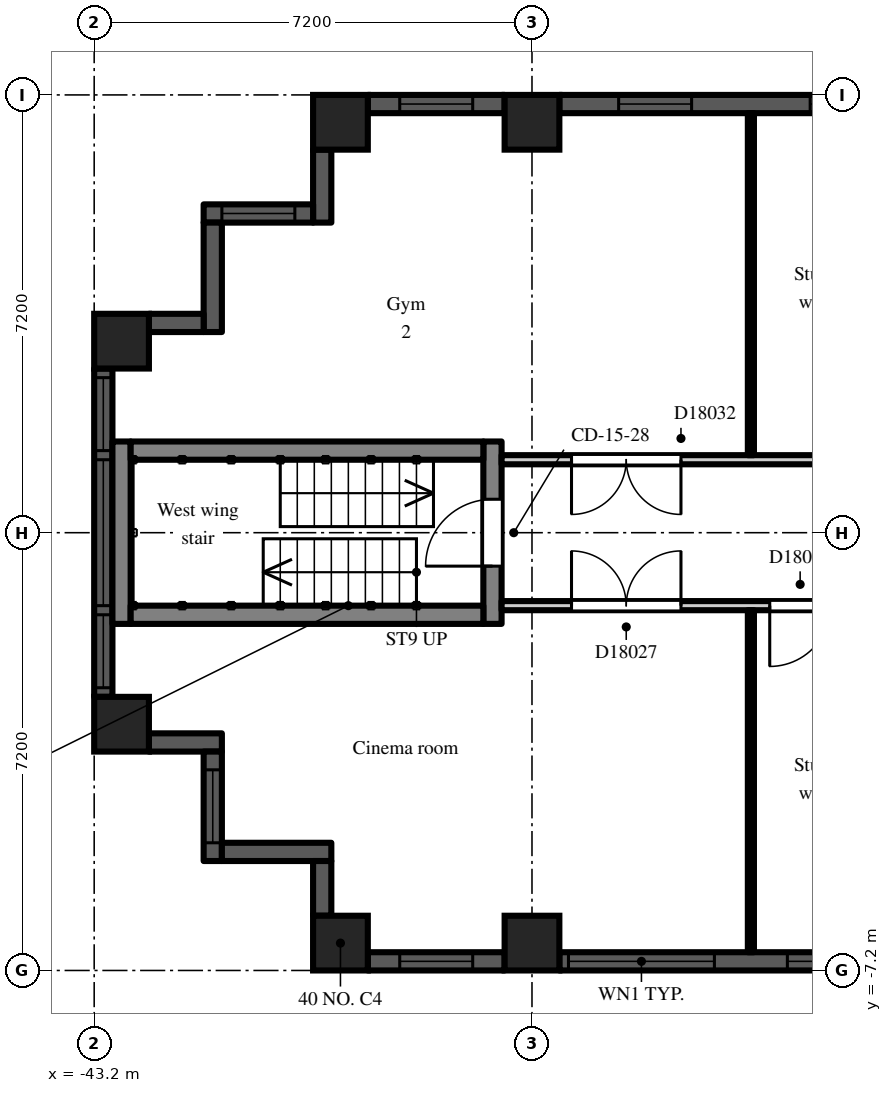
"""IFC4 building model, lengths in metres.
Left out: names, types, materials, properties, quantities, classifications, styles, units other than length and angle.
Written with IfcOpenShell. Run it as: python <this file> out.ifc"""

import sys

from ifc_helpers import new_model, si_unit, direction, frame, frame_2d, origin, origin_2d, place, context, subcontext, project, spatial, rectangle, extrude, element, fill, save


model = new_model("IFC4")
c1 = context("Model", 3, precision=1e-05, world=origin(), true_north=direction((0.0, 1.0)))
c2 = subcontext(c1, "Body", "Model", "MODEL_VIEW")
j1 = project(units=[si_unit("LENGTHUNIT", "METRE"), si_unit("PLANEANGLEUNIT", "RADIAN")], contexts=[c1])
p1 = place(None, origin())
s1 = spatial("IfcSite", under=j1, at=p1, CompositionType="ELEMENT")
p2 = place(p1, origin())
s2 = spatial("IfcBuilding", under=s1, at=p2, CompositionType="ELEMENT")
p3 = place(p2, frame((0.0, 0.0, 120.3)))
s3 = spatial("IfcBuildingStorey", under=s2, at=p3, CompositionType="ELEMENT", Elevation=120.3)
for number, where, z_axis, x_axis in (
    (1, (-42.75, -3.15, 0.0), (0.0, 0.0, 1.0), (1.0, 0.0, 0.0)),
    (2, (-42.75, 3.15, 0.0), (0.0, 0.0, 1.0), (1.0, 0.0, 0.0)),
    (3, (-39.15, -6.75, 0.0), (0.0, 0.0, 1.0), (1.0, 0.0, 0.0)),
    (4, (-39.15, 6.75, 0.0), (0.0, 0.0, 1.0), (1.0, 0.0, 0.0)),
    (5, (-36.0, -6.75, 0.0), (0.0, 0.0, 1.0), (1.0, 0.0, 0.0)),
    (6, (-36.0, 6.75, 0.0), (0.0, 0.0, 1.0), (1.0, 0.0, 0.0)),
):
    element("IfcColumn", number, at=place(p3, frame(where, z_axis=z_axis, x_axis=x_axis)), inside=s3, PredefinedType="COLUMN", context=c2, shape_type="SweptSolid", body=[
        extrude(rectangle(XDim=0.9, YDim=0.9, at=origin_2d()), origin(), (0.0, 0.0, 1.0), 3.0),
    ])
p4 = place(p3, frame((-29.25, 7.05, 0.0), z_axis=(0.0, 0.0, 1.0), x_axis=(-1.0, 0.0, 0.0)))
e7 = element("IfcWall", 7, at=p4, inside=s3, PredefinedType="SOLIDWALL", context=c2, shape_type="SweptSolid", body=[
    extrude(rectangle(XDim=6.3, YDim=0.3, at=frame_2d((3.15, 0.0))), origin(), (0.0, 0.0, 1.0), 2.2),
])
p5 = place(p4, frame((0.975, 0.0, 0.2)))
e8 = element("IfcOpeningElement", 8, at=p5, cuts=e7, PredefinedType="OPENING", context=c2, shape_type="SweptSolid", body=[
    extrude(rectangle(XDim=1.2, YDim=1.85, at=frame_2d((0.6, 0.925))), frame((0.0, 0.16, 0.0), z_axis=(0.0, -1.0, 0.0), x_axis=(1.0, 0.0, 0.0)), (0.0, 0.0, 1.0), 0.32),
])
p6 = place(p4, frame((4.125, 0.0, 0.2)))
e9 = element("IfcOpeningElement", 9, at=p6, cuts=e7, PredefinedType="OPENING", context=c2, shape_type="SweptSolid", body=[
    extrude(rectangle(XDim=1.2, YDim=1.85, at=frame_2d((0.6, 0.925))), frame((0.0, 0.16, 0.0), z_axis=(0.0, -1.0, 0.0), x_axis=(1.0, 0.0, 0.0)), (0.0, 0.0, 1.0), 0.32),
])
p7 = place(p3, frame((-36.45, 7.05, 0.0), z_axis=(0.0, 0.0, 1.0), x_axis=(-1.0, 0.0, 0.0)))
e10 = element("IfcWall", 10, at=p7, inside=s3, PredefinedType="SOLIDWALL", context=c2, shape_type="SweptSolid", body=[
    extrude(rectangle(XDim=2.25, YDim=0.3, at=frame_2d((1.125, 0.0))), origin(), (0.0, 0.0, 1.0), 2.2),
])
p8 = place(p7, frame((0.525, 0.0, 0.2)))
e11 = element("IfcOpeningElement", 11, at=p8, cuts=e10, PredefinedType="OPENING", context=c2, shape_type="SweptSolid", body=[
    extrude(rectangle(XDim=1.2, YDim=1.85, at=frame_2d((0.6, 0.925))), frame((0.0, 0.16, 0.0), z_axis=(0.0, -1.0, 0.0), x_axis=(1.0, 0.0, 0.0)), (0.0, 0.0, 1.0), 0.32),
])
p9 = place(p3, frame((-39.45, 6.3, 0.0), z_axis=(0.0, 0.0, 1.0), x_axis=(0.0, -1.0, 0.0)))
e12 = element("IfcWall", 12, at=p9, inside=s3, PredefinedType="SOLIDWALL", context=c2, shape_type="SweptSolid", body=[
    extrude(rectangle(XDim=1.2, YDim=0.3, at=frame_2d((0.6, 0.0))), origin(), (0.0, 0.0, 1.0), 2.6),
])
p10 = place(p3, frame((-39.6, 5.25, 0.0), z_axis=(0.0, 0.0, 1.0), x_axis=(-1.0, 0.0, 0.0)))
e13 = element("IfcWall", 13, at=p10, inside=s3, PredefinedType="SOLIDWALL", context=c2, shape_type="SweptSolid", body=[
    extrude(rectangle(XDim=1.8, YDim=0.3, at=frame_2d((0.9, 0.0))), origin(), (0.0, 0.0, 1.0), 2.6),
])
p11 = place(p10, frame((0.3, 0.0, 0.2)))
e14 = element("IfcOpeningElement", 14, at=p11, cuts=e13, PredefinedType="OPENING", context=c2, shape_type="SweptSolid", body=[
    extrude(rectangle(XDim=1.2, YDim=1.85, at=frame_2d((0.6, 0.925))), frame((0.0, 0.16, 0.0), z_axis=(0.0, -1.0, 0.0), x_axis=(1.0, 0.0, 0.0)), (0.0, 0.0, 1.0), 0.32),
])
p12 = place(p3, frame((-41.25, 5.1, 0.0), z_axis=(0.0, 0.0, 1.0), x_axis=(0.0, -1.0, 0.0)))
e15 = element("IfcWall", 15, at=p12, inside=s3, PredefinedType="SOLIDWALL", context=c2, shape_type="SweptSolid", body=[
    extrude(rectangle(XDim=1.8, YDim=0.3, at=frame_2d((0.9, 0.0))), origin(), (0.0, 0.0, 1.0), 2.6),
])
p13 = place(p3, frame((-41.4, 3.45, 0.0), z_axis=(0.0, 0.0, 1.0), x_axis=(-1.0, 0.0, 0.0)))
e16 = element("IfcWall", 16, at=p13, inside=s3, PredefinedType="SOLIDWALL", context=c2, shape_type="SweptSolid", body=[
    extrude(rectangle(XDim=0.9, YDim=0.3, at=frame_2d((0.45, 0.0))), origin(), (0.0, 0.0, 1.0), 2.6),
])
p14 = place(p3, frame((-43.05, 2.7, 0.0), z_axis=(0.0, 0.0, 1.0), x_axis=(0.0, -1.0, 0.0)))
e17 = element("IfcWall", 17, at=p14, inside=s3, PredefinedType="SOLIDWALL", context=c2, shape_type="SweptSolid", body=[
    extrude(rectangle(XDim=5.4, YDim=0.3, at=frame_2d((2.7, 0.0))), origin(), (0.0, 0.0, 1.0), 2.2),
])
p15 = place(p14, frame((1.5, 0.0, 0.2)))
e18 = element("IfcOpeningElement", 18, at=p15, cuts=e17, PredefinedType="OPENING", context=c2, shape_type="SweptSolid", body=[
    extrude(rectangle(XDim=2.4, YDim=1.85, at=frame_2d((1.2, 0.925))), frame((0.0, 0.16, 0.0), z_axis=(0.0, -1.0, 0.0), x_axis=(1.0, 0.0, 0.0)), (0.0, 0.0, 1.0), 0.32),
])
p16 = place(p14, frame((0.15, 0.0, 0.2)))
e19 = element("IfcOpeningElement", 19, at=p16, cuts=e17, PredefinedType="OPENING", context=c2, shape_type="SweptSolid", body=[
    extrude(rectangle(XDim=1.2, YDim=1.85, at=frame_2d((0.6, 0.925))), frame((0.0, 0.16, 0.0), z_axis=(0.0, -1.0, 0.0), x_axis=(1.0, 0.0, 0.0)), (0.0, 0.0, 1.0), 0.32),
])
p17 = place(p14, frame((4.05, 0.0, 0.2)))
e20 = element("IfcOpeningElement", 20, at=p17, cuts=e17, PredefinedType="OPENING", context=c2, shape_type="SweptSolid", body=[
    extrude(rectangle(XDim=1.2, YDim=1.85, at=frame_2d((0.6, 0.925))), frame((0.0, 0.16, 0.0), z_axis=(0.0, -1.0, 0.0), x_axis=(1.0, 0.0, 0.0)), (0.0, 0.0, 1.0), 0.32),
])
p18 = place(p3, frame((-42.3, -3.45, 0.0), z_axis=(0.0, 0.0, 1.0), x_axis=(1.0, 0.0, 0.0)))
e21 = element("IfcWall", 21, at=p18, inside=s3, PredefinedType="SOLIDWALL", context=c2, shape_type="SweptSolid", body=[
    extrude(rectangle(XDim=1.2, YDim=0.3, at=frame_2d((0.6, 0.0))), origin(), (0.0, 0.0, 1.0), 2.6),
])
p19 = place(p3, frame((-41.25, -3.6, 0.0), z_axis=(0.0, 0.0, 1.0), x_axis=(0.0, -1.0, 0.0)))
e22 = element("IfcWall", 22, at=p19, inside=s3, PredefinedType="SOLIDWALL", context=c2, shape_type="SweptSolid", body=[
    extrude(rectangle(XDim=1.8, YDim=0.3, at=frame_2d((0.9, 0.0))), origin(), (0.0, 0.0, 1.0), 2.6),
])
p20 = place(p19, frame((0.3, 0.0, 0.2)))
e23 = element("IfcOpeningElement", 23, at=p20, cuts=e22, PredefinedType="OPENING", context=c2, shape_type="SweptSolid", body=[
    extrude(rectangle(XDim=1.2, YDim=1.85, at=frame_2d((0.6, 0.925))), frame((0.0, 0.16, 0.0), z_axis=(0.0, -1.0, 0.0), x_axis=(1.0, 0.0, 0.0)), (0.0, 0.0, 1.0), 0.32),
])
p21 = place(p3, frame((-41.1, -5.25, 0.0), z_axis=(0.0, 0.0, 1.0), x_axis=(1.0, 0.0, 0.0)))
e24 = element("IfcWall", 24, at=p21, inside=s3, PredefinedType="SOLIDWALL", context=c2, shape_type="SweptSolid", body=[
    extrude(rectangle(XDim=1.8, YDim=0.3, at=frame_2d((0.9, 0.0))), origin(), (0.0, 0.0, 1.0), 2.6),
])
p22 = place(p3, frame((-39.45, -5.4, 0.0), z_axis=(0.0, 0.0, 1.0), x_axis=(0.0, -1.0, 0.0)))
e25 = element("IfcWall", 25, at=p22, inside=s3, PredefinedType="SOLIDWALL", context=c2, shape_type="SweptSolid", body=[
    extrude(rectangle(XDim=0.9, YDim=0.3, at=frame_2d((0.45, 0.0))), origin(), (0.0, 0.0, 1.0), 2.6),
])
p23 = place(p3, frame((-38.7, -7.05, 0.0), z_axis=(0.0, 0.0, 1.0), x_axis=(1.0, 0.0, 0.0)))
e26 = element("IfcWall", 26, at=p23, inside=s3, PredefinedType="SOLIDWALL", context=c2, shape_type="SweptSolid", body=[
    extrude(rectangle(XDim=2.25, YDim=0.3, at=frame_2d((1.125, 0.0))), origin(), (0.0, 0.0, 1.0), 2.2),
])
p24 = place(p23, frame((0.525, 0.0, 0.2)))
e27 = element("IfcOpeningElement", 27, at=p24, cuts=e26, PredefinedType="OPENING", context=c2, shape_type="SweptSolid", body=[
    extrude(rectangle(XDim=1.2, YDim=1.85, at=frame_2d((0.6, 0.925))), frame((0.0, 0.16, 0.0), z_axis=(0.0, -1.0, 0.0), x_axis=(1.0, 0.0, 0.0)), (0.0, 0.0, 1.0), 0.32),
])
p25 = place(p3, frame((-35.55, -7.05, 0.0), z_axis=(0.0, 0.0, 1.0), x_axis=(1.0, 0.0, 0.0)))
e28 = element("IfcWall", 28, at=p25, inside=s3, PredefinedType="SOLIDWALL", context=c2, shape_type="SweptSolid", body=[
    extrude(rectangle(XDim=6.3, YDim=0.3, at=frame_2d((3.15, 0.0))), origin(), (0.0, 0.0, 1.0), 2.2),
])
p26 = place(p25, frame((0.15, 0.0, 0.2)))
e29 = element("IfcOpeningElement", 29, at=p26, cuts=e28, PredefinedType="OPENING", context=c2, shape_type="SweptSolid", body=[
    extrude(rectangle(XDim=2.4, YDim=1.85, at=frame_2d((1.2, 0.925))), frame((0.0, 0.16, 0.0), z_axis=(0.0, -1.0, 0.0), x_axis=(1.0, 0.0, 0.0)), (0.0, 0.0, 1.0), 0.32),
])
p27 = place(p25, frame((3.75, 0.0, 0.2)))
e30 = element("IfcOpeningElement", 30, at=p27, cuts=e28, PredefinedType="OPENING", context=c2, shape_type="SweptSolid", body=[
    extrude(rectangle(XDim=2.4, YDim=1.85, at=frame_2d((1.2, 0.925))), frame((0.0, 0.16, 0.0), z_axis=(0.0, -1.0, 0.0), x_axis=(1.0, 0.0, 0.0)), (0.0, 0.0, 1.0), 0.32),
])
p28 = place(p3, frame((-36.65, -1.5, 0.0), z_axis=(0.0, 0.0, 1.0), x_axis=(0.0, 1.0, 0.0)))
e31 = element("IfcWall", 31, at=p28, inside=s3, PredefinedType="SHEAR", context=c2, shape_type="SweptSolid", body=[
    extrude(rectangle(XDim=3.0, YDim=0.3, at=frame_2d((1.5, 0.0))), origin(), (0.0, 0.0, 1.0), 2.6),
])
p29 = place(p28, frame((0.95, 0.0, 0.0)))
e32 = element("IfcOpeningElement", 32, at=p29, cuts=e31, PredefinedType="OPENING", context=c2, shape_type="SweptSolid", body=[
    extrude(rectangle(XDim=1.1, YDim=2.1, at=frame_2d((0.55, 1.05))), frame((0.0, 0.16, 0.0), z_axis=(0.0, -1.0, 0.0), x_axis=(1.0, 0.0, 0.0)), (0.0, 0.0, 1.0), 0.32),
])
p30 = place(p3, frame((-42.75, -1.5, 0.0), z_axis=(0.0, 0.0, 1.0), x_axis=(0.0, 1.0, 0.0)))
e33 = element("IfcWall", 33, at=p30, inside=s3, PredefinedType="SHEAR", context=c2, shape_type="SweptSolid", body=[
    extrude(rectangle(XDim=3.0, YDim=0.3, at=frame_2d((1.5, 0.0))), origin(), (0.0, 0.0, 1.0), 2.6),
])
for number, where, z_axis, x_axis in (
    (34, (-36.8, -1.35, 0.0), (0.0, 0.0, 1.0), (-1.0, 0.0, 0.0)),
    (35, (-36.8, 1.35, 0.0), (0.0, 0.0, 1.0), (-1.0, 0.0, 0.0)),
):
    element("IfcWall", number, at=place(p3, frame(where, z_axis=z_axis, x_axis=x_axis)), inside=s3, PredefinedType="SHEAR", context=c2, shape_type="SweptSolid", body=[
        extrude(rectangle(XDim=5.8, YDim=0.3, at=frame_2d((2.9, 0.0))), origin(), (0.0, 0.0, 1.0), 2.6),
    ])
p31 = place(p3, frame((-36.5, -1.2, 0.0), z_axis=(0.0, 0.0, 1.0), x_axis=(1.0, 0.0, 0.0)))
e36 = element("IfcWall", 36, at=p31, inside=s3, PredefinedType="PARTITIONING", context=c2, shape_type="SweptSolid", body=[
    extrude(rectangle(XDim=14.9, YDim=0.15, at=frame_2d((7.45, 0.0))), origin(), (0.0, 0.0, 1.0), 2.6),
])
p32 = place(p31, frame((13.3, 0.0, 0.0)))
e37 = element("IfcOpeningElement", 37, at=p32, cuts=e36, PredefinedType="OPENING", context=c2, shape_type="SweptSolid", body=[
    extrude(rectangle(XDim=1.0, YDim=2.1, at=frame_2d((0.5, 1.05))), frame((0.0, 0.085, 0.0), z_axis=(0.0, -1.0, 0.0), x_axis=(1.0, 0.0, 0.0)), (0.0, 0.0, 1.0), 0.17),
])
p33 = place(p31, frame((4.41, 0.0, 0.0)))
e38 = element("IfcOpeningElement", 38, at=p33, cuts=e36, PredefinedType="OPENING", context=c2, shape_type="SweptSolid", body=[
    extrude(rectangle(XDim=1.0, YDim=2.1, at=frame_2d((0.5, 1.05))), frame((0.0, 0.085, 0.0), z_axis=(0.0, -1.0, 0.0), x_axis=(1.0, 0.0, 0.0)), (0.0, 0.0, 1.0), 0.17),
])
p34 = place(p31, frame((1.15, 0.0, 0.0)))
e39 = element("IfcOpeningElement", 39, at=p34, cuts=e36, PredefinedType="OPENING", context=c2, shape_type="SweptSolid", body=[
    extrude(rectangle(XDim=1.8, YDim=2.1, at=frame_2d((0.9, 1.05))), frame((0.0, 0.085, 0.0), z_axis=(0.0, -1.0, 0.0), x_axis=(1.0, 0.0, 0.0)), (0.0, 0.0, 1.0), 0.17),
])
p35 = place(p3, frame((-36.5, 1.2, 0.0), z_axis=(0.0, 0.0, 1.0), x_axis=(1.0, 0.0, 0.0)))
e40 = element("IfcWall", 40, at=p35, inside=s3, PredefinedType="PARTITIONING", context=c2, shape_type="SweptSolid", body=[
    extrude(rectangle(XDim=14.9, YDim=0.15, at=frame_2d((7.45, 0.0))), origin(), (0.0, 0.0, 1.0), 2.6),
])
p36 = place(p35, frame((13.7, 0.0, 0.0)))
e41 = element("IfcOpeningElement", 41, at=p36, cuts=e40, PredefinedType="OPENING", context=c2, shape_type="SweptSolid", body=[
    extrude(rectangle(XDim=1.0, YDim=2.1, at=frame_2d((0.5, 1.05))), frame((0.0, 0.085, 0.0), z_axis=(0.0, -1.0, 0.0), x_axis=(1.0, 0.0, 0.0)), (0.0, 0.0, 1.0), 0.17),
])
p37 = place(p35, frame((8.19, 0.0, 0.0)))
e42 = element("IfcOpeningElement", 42, at=p37, cuts=e40, PredefinedType="OPENING", context=c2, shape_type="SweptSolid", body=[
    extrude(rectangle(XDim=1.0, YDim=2.1, at=frame_2d((0.5, 1.05))), frame((0.0, 0.085, 0.0), z_axis=(0.0, -1.0, 0.0), x_axis=(1.0, 0.0, 0.0)), (0.0, 0.0, 1.0), 0.17),
])
p38 = place(p35, frame((1.15, 0.0, 0.0)))
e43 = element("IfcOpeningElement", 43, at=p38, cuts=e40, PredefinedType="OPENING", context=c2, shape_type="SweptSolid", body=[
    extrude(rectangle(XDim=1.8, YDim=2.1, at=frame_2d((0.9, 1.05))), frame((0.0, 0.085, 0.0), z_axis=(0.0, -1.0, 0.0), x_axis=(1.0, 0.0, 0.0)), (0.0, 0.0, 1.0), 0.17),
])
for number, where, z_axis, x_axis in (
    (44, (-32.4, -6.9, 0.0), (0.0, 0.0, 1.0), (0.0, 1.0, 0.0)),
    (45, (-32.4, 1.275, 0.0), (0.0, 0.0, 1.0), (0.0, 1.0, 0.0)),
):
    element("IfcWall", number, at=place(p3, frame(where, z_axis=z_axis, x_axis=x_axis)), inside=s3, PredefinedType="PARTITIONING", context=c2, shape_type="SweptSolid", body=[
        extrude(rectangle(XDim=5.625, YDim=0.1, at=frame_2d((2.812, 0.0))), origin(), (0.0, 0.0, 1.0), 2.6),
    ])
p39 = place(p5, origin())
e46 = element("IfcWindow", 46, at=p39, inside=s3, PartitioningType="SINGLE_PANEL", PredefinedType="WINDOW", context=c2, shape_type="SweptSolid", body=[
    extrude(rectangle(XDim=1.2, YDim=1.85, at=frame_2d((0.6, 0.925))), frame((0.0, 0.03, 0.0), z_axis=(0.0, -1.0, 0.0), x_axis=(1.0, 0.0, 0.0)), (0.0, 0.0, 1.0), 0.06),
])
fill(e8, e46)
p40 = place(p6, origin())
e47 = element("IfcWindow", 47, at=p40, inside=s3, PartitioningType="SINGLE_PANEL", PredefinedType="WINDOW", context=c2, shape_type="SweptSolid", body=[
    extrude(rectangle(XDim=1.2, YDim=1.85, at=frame_2d((0.6, 0.925))), frame((0.0, 0.03, 0.0), z_axis=(0.0, -1.0, 0.0), x_axis=(1.0, 0.0, 0.0)), (0.0, 0.0, 1.0), 0.06),
])
fill(e9, e47)
p41 = place(p8, origin())
e48 = element("IfcWindow", 48, at=p41, inside=s3, PartitioningType="SINGLE_PANEL", PredefinedType="WINDOW", context=c2, shape_type="SweptSolid", body=[
    extrude(rectangle(XDim=1.2, YDim=1.85, at=frame_2d((0.6, 0.925))), frame((0.0, 0.03, 0.0), z_axis=(0.0, -1.0, 0.0), x_axis=(1.0, 0.0, 0.0)), (0.0, 0.0, 1.0), 0.06),
])
fill(e11, e48)
p42 = place(p11, origin())
e49 = element("IfcWindow", 49, at=p42, inside=s3, PartitioningType="SINGLE_PANEL", PredefinedType="WINDOW", context=c2, shape_type="SweptSolid", body=[
    extrude(rectangle(XDim=1.2, YDim=1.85, at=frame_2d((0.6, 0.925))), frame((0.0, 0.03, 0.0), z_axis=(0.0, -1.0, 0.0), x_axis=(1.0, 0.0, 0.0)), (0.0, 0.0, 1.0), 0.06),
])
fill(e14, e49)
p43 = place(p15, origin())
e50 = element("IfcWindow", 50, at=p43, inside=s3, PartitioningType="SINGLE_PANEL", PredefinedType="WINDOW", context=c2, shape_type="SweptSolid", body=[
    extrude(rectangle(XDim=2.4, YDim=1.85, at=frame_2d((1.2, 0.925))), frame((0.0, 0.03, 0.0), z_axis=(0.0, -1.0, 0.0), x_axis=(1.0, 0.0, 0.0)), (0.0, 0.0, 1.0), 0.06),
])
fill(e18, e50)
p44 = place(p16, origin())
e51 = element("IfcWindow", 51, at=p44, inside=s3, PartitioningType="SINGLE_PANEL", PredefinedType="WINDOW", context=c2, shape_type="SweptSolid", body=[
    extrude(rectangle(XDim=1.2, YDim=1.85, at=frame_2d((0.6, 0.925))), frame((0.0, 0.03, 0.0), z_axis=(0.0, -1.0, 0.0), x_axis=(1.0, 0.0, 0.0)), (0.0, 0.0, 1.0), 0.06),
])
fill(e19, e51)
p45 = place(p17, origin())
e52 = element("IfcWindow", 52, at=p45, inside=s3, PartitioningType="SINGLE_PANEL", PredefinedType="WINDOW", context=c2, shape_type="SweptSolid", body=[
    extrude(rectangle(XDim=1.2, YDim=1.85, at=frame_2d((0.6, 0.925))), frame((0.0, 0.03, 0.0), z_axis=(0.0, -1.0, 0.0), x_axis=(1.0, 0.0, 0.0)), (0.0, 0.0, 1.0), 0.06),
])
fill(e20, e52)
p46 = place(p20, origin())
e53 = element("IfcWindow", 53, at=p46, inside=s3, PartitioningType="SINGLE_PANEL", PredefinedType="WINDOW", context=c2, shape_type="SweptSolid", body=[
    extrude(rectangle(XDim=1.2, YDim=1.85, at=frame_2d((0.6, 0.925))), frame((0.0, 0.03, 0.0), z_axis=(0.0, -1.0, 0.0), x_axis=(1.0, 0.0, 0.0)), (0.0, 0.0, 1.0), 0.06),
])
fill(e23, e53)
p47 = place(p24, origin())
e54 = element("IfcWindow", 54, at=p47, inside=s3, PartitioningType="SINGLE_PANEL", PredefinedType="WINDOW", context=c2, shape_type="SweptSolid", body=[
    extrude(rectangle(XDim=1.2, YDim=1.85, at=frame_2d((0.6, 0.925))), frame((0.0, 0.03, 0.0), z_axis=(0.0, -1.0, 0.0), x_axis=(1.0, 0.0, 0.0)), (0.0, 0.0, 1.0), 0.06),
])
fill(e27, e54)
p48 = place(p26, origin())
e55 = element("IfcWindow", 55, at=p48, inside=s3, PartitioningType="SINGLE_PANEL", PredefinedType="WINDOW", context=c2, shape_type="SweptSolid", body=[
    extrude(rectangle(XDim=2.4, YDim=1.85, at=frame_2d((1.2, 0.925))), frame((0.0, 0.03, 0.0), z_axis=(0.0, -1.0, 0.0), x_axis=(1.0, 0.0, 0.0)), (0.0, 0.0, 1.0), 0.06),
])
fill(e29, e55)
p49 = place(p27, origin())
e56 = element("IfcWindow", 56, at=p49, inside=s3, PartitioningType="SINGLE_PANEL", PredefinedType="WINDOW", context=c2, shape_type="SweptSolid", body=[
    extrude(rectangle(XDim=2.4, YDim=1.85, at=frame_2d((1.2, 0.925))), frame((0.0, 0.03, 0.0), z_axis=(0.0, -1.0, 0.0), x_axis=(1.0, 0.0, 0.0)), (0.0, 0.0, 1.0), 0.06),
])
fill(e30, e56)
p50 = place(p29, origin())
e57 = element("IfcDoor", 57, at=p50, inside=s3, OperationType="SINGLE_SWING_LEFT", PredefinedType="DOOR", context=c2, shape_type="SweptSolid", body=[
    extrude(rectangle(XDim=1.1, YDim=2.1, at=frame_2d((0.55, 1.05))), frame((0.0, 0.025, 0.0), z_axis=(0.0, -1.0, 0.0), x_axis=(1.0, 0.0, 0.0)), (0.0, 0.0, 1.0), 0.05),
])
fill(e32, e57)
p51 = place(p33, frame((1.0, 0.0, 0.0), z_axis=(0.0, 0.0, 1.0), x_axis=(-1.0, 0.0, 0.0)))
e58 = element("IfcDoor", 58, at=p51, inside=s3, OperationType="SINGLE_SWING_RIGHT", PredefinedType="DOOR", context=c2, shape_type="SweptSolid", body=[
    extrude(rectangle(XDim=1.0, YDim=2.1, at=frame_2d((0.5, 1.05))), frame((0.0, 0.025, 0.0), z_axis=(0.0, -1.0, 0.0), x_axis=(1.0, 0.0, 0.0)), (0.0, 0.0, 1.0), 0.05),
])
fill(e38, e58)
p52 = place(p34, origin())
e59 = element("IfcDoor", 59, at=p52, inside=s3, OperationType="DOUBLE_DOOR_DOUBLE_SWING", PredefinedType="DOOR", context=c2, shape_type="SweptSolid", body=[
    extrude(rectangle(XDim=1.8, YDim=2.1, at=frame_2d((0.9, 1.05))), frame((0.0, 0.025, 0.0), z_axis=(0.0, -1.0, 0.0), x_axis=(1.0, 0.0, 0.0)), (0.0, 0.0, 1.0), 0.05),
])
fill(e39, e59)
p53 = place(p38, frame((1.8, 0.0, 0.0), z_axis=(0.0, 0.0, 1.0), x_axis=(-1.0, 0.0, 0.0)))
e60 = element("IfcDoor", 60, at=p53, inside=s3, OperationType="DOUBLE_DOOR_DOUBLE_SWING", PredefinedType="DOOR", context=c2, shape_type="SweptSolid", body=[
    extrude(rectangle(XDim=1.8, YDim=2.1, at=frame_2d((0.9, 1.05))), frame((0.0, 0.025, 0.0), z_axis=(0.0, -1.0, 0.0), x_axis=(1.0, 0.0, 0.0)), (0.0, 0.0, 1.0), 0.05),
])
fill(e43, e60)
save(model, sys.argv[1])
